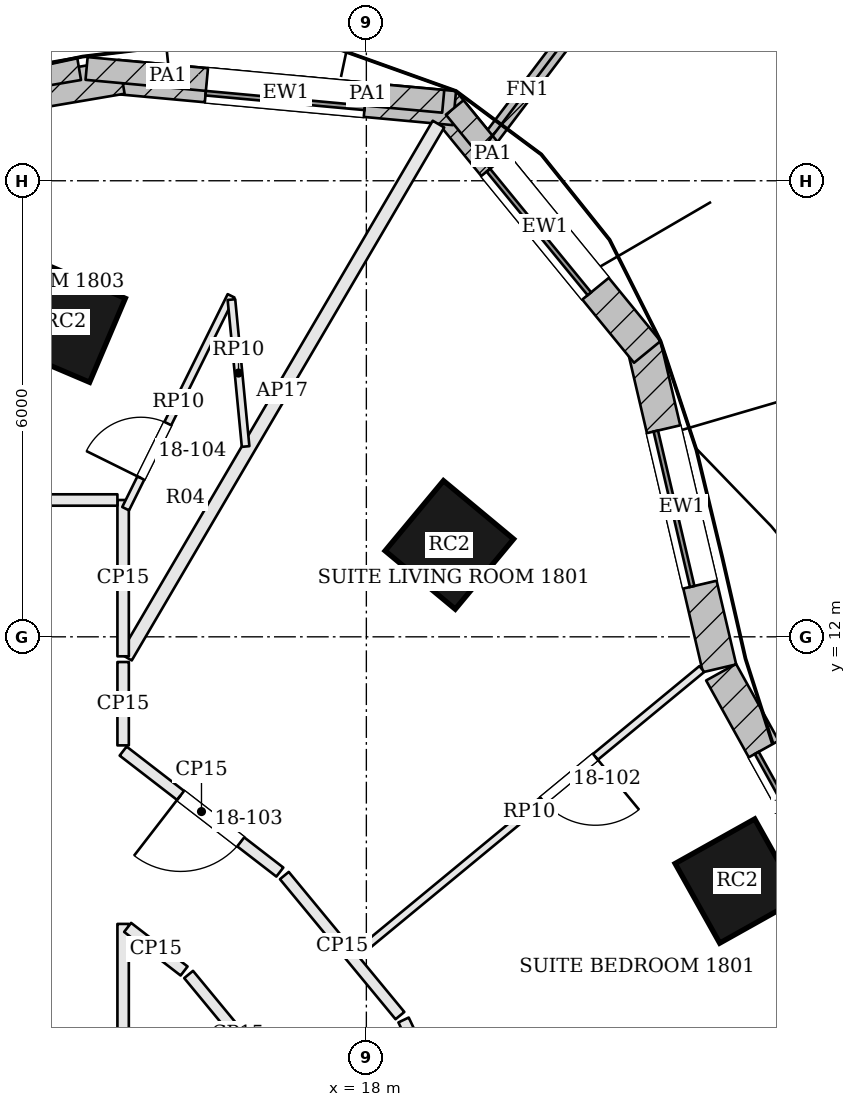
"""IFC4 building model, lengths in metres.
Left out: names, types, materials, properties, quantities, classifications, styles, units other than length and angle.
Written with IfcOpenShell. Run it as: python <this file> out.ifc"""

import sys

from ifc_helpers import new_model, si_unit, direction, frame, frame_2d, origin, origin_2d, place, context, subcontext, project, spatial, rectangle, extrude, element, fill, save


model = new_model("IFC4")
c1 = context("Model", 3, precision=1e-05, world=origin(), true_north=direction((0.0, 1.0)))
c2 = subcontext(c1, "Body", "Model", "MODEL_VIEW")
j1 = project(units=[si_unit("LENGTHUNIT", "METRE"), si_unit("PLANEANGLEUNIT", "RADIAN")], contexts=[c1])
p1 = place(None, origin())
s1 = spatial("IfcSite", under=j1, at=p1, CompositionType="ELEMENT")
p2 = place(p1, origin())
s2 = spatial("IfcBuilding", under=s1, at=p2, CompositionType="ELEMENT")
p3 = place(p2, frame((0.0, 0.0, 81.6)))
s3 = spatial("IfcBuildingStorey", under=s2, at=p3, CompositionType="ELEMENT", Elevation=81.6)
for number, where, z_axis, x_axis in (
    (1, (22.879, 8.787, -0.7), (0.0, 0.0, 1.0), (-0.489, 0.873, 0.0)),
    (2, (19.092, 13.209, -0.7), (0.0, 0.0, 1.0), (-0.769, 0.639, 0.0)),
    (3, (14.042, 16.136, -0.7), (0.0, 0.0, 1.0), (-0.92, 0.392, 0.0)),
):
    element("IfcColumn", number, at=place(p3, frame(where, z_axis=z_axis, x_axis=x_axis)), inside=s3, PredefinedType="COLUMN", context=c2, shape_type="SweptSolid", body=[
        extrude(rectangle(XDim=1.2, YDim=1.2, at=origin_2d()), origin(), (0.0, 0.0, 1.0), 4.3),
    ])
p4 = place(p3, frame((24.662, 7.939, 0.0), z_axis=(0.0, 0.0, 1.0), x_axis=(-0.485153910721, 0.874428775208, 0.0)))
e4 = element("IfcWall", 4, at=p4, inside=s3, PredefinedType="SOLIDWALL", context=c2, shape_type="SweptSolid", body=[
    extrude(rectangle(XDim=4.112, YDim=0.45, at=frame_2d((2.056, 0.0))), origin(), (0.0, 0.0, 1.0), 3.4),
])
p5 = place(p4, frame((1.156, 0.0, 0.9)))
e5 = element("IfcOpeningElement", 5, at=p5, cuts=e4, PredefinedType="OPENING", context=c2, shape_type="SweptSolid", body=[
    extrude(rectangle(XDim=1.8, YDim=2.0, at=frame_2d((0.9, 1.0))), frame((0.0, 0.235, 0.0), z_axis=(0.0, -1.0, 0.0), x_axis=(1.0, 0.0, 0.0)), (0.0, 0.0, 1.0), 0.47),
])
p6 = place(p3, frame((22.646, 11.586, 0.0), z_axis=(0.0, 0.0, 1.0), x_axis=(-0.227925124198, 0.973678662475, 0.0)))
e6 = element("IfcWall", 6, at=p6, inside=s3, PredefinedType="SOLIDWALL", context=c2, shape_type="SweptSolid", body=[
    extrude(rectangle(XDim=4.361, YDim=0.45, at=frame_2d((2.18, 0.0))), origin(), (0.0, 0.0, 1.0), 3.4),
])
p7 = place(p6, frame((1.13, 0.0, 0.9)))
e7 = element("IfcOpeningElement", 7, at=p7, cuts=e6, PredefinedType="OPENING", context=c2, shape_type="SweptSolid", body=[
    extrude(rectangle(XDim=2.1, YDim=2.0, at=frame_2d((1.05, 1.0))), frame((0.0, 0.235, 0.0), z_axis=(0.0, -1.0, 0.0), x_axis=(1.0, 0.0, 0.0)), (0.0, 0.0, 1.0), 0.47),
])
p8 = place(p3, frame((21.696, 15.748, 0.0), z_axis=(0.0, 0.0, 1.0), x_axis=(-0.632968710519, 0.774177377288, 0.0)))
e8 = element("IfcWall", 8, at=p8, inside=s3, PredefinedType="SOLIDWALL", context=c2, shape_type="SweptSolid", body=[
    extrude(rectangle(XDim=4.25, YDim=0.45, at=frame_2d((2.125, 0.0))), origin(), (0.0, 0.0, 1.0), 3.4),
])
p9 = place(p8, frame((1.075, 0.0, 0.9)))
e9 = element("IfcOpeningElement", 9, at=p9, cuts=e8, PredefinedType="OPENING", context=c2, shape_type="SweptSolid", body=[
    extrude(rectangle(XDim=2.1, YDim=2.0, at=frame_2d((1.05, 1.0))), frame((0.0, 0.235, 0.0), z_axis=(0.0, -1.0, 0.0), x_axis=(1.0, 0.0, 0.0)), (0.0, 0.0, 1.0), 0.47),
])
p10 = place(p3, frame((19.159, 18.956, 0.0), z_axis=(0.0, 0.0, 1.0), x_axis=(-0.995777399421, 0.091800712424, 0.0)))
e10 = element("IfcWall", 10, at=p10, inside=s3, PredefinedType="SOLIDWALL", context=c2, shape_type="SweptSolid", body=[
    extrude(rectangle(XDim=4.455, YDim=0.45, at=frame_2d((2.227, 0.0))), origin(), (0.0, 0.0, 1.0), 3.4),
])
p11 = place(p10, frame((1.177, 0.0, 0.9)))
e11 = element("IfcOpeningElement", 11, at=p11, cuts=e10, PredefinedType="OPENING", context=c2, shape_type="SweptSolid", body=[
    extrude(rectangle(XDim=2.1, YDim=2.0, at=frame_2d((1.05, 1.0))), frame((0.0, 0.235, 0.0), z_axis=(0.0, -1.0, 0.0), x_axis=(1.0, 0.0, 0.0)), (0.0, 0.0, 1.0), 0.47),
])
p12 = place(p3, frame((14.782, 19.367, 0.0), z_axis=(0.0, 0.0, 1.0), x_axis=(-0.98585584667, -0.167595493934, 0.0)))
e12 = element("IfcWall", 12, at=p12, inside=s3, PredefinedType="SOLIDWALL", context=c2, shape_type="SweptSolid", body=[
    extrude(rectangle(XDim=5.399, YDim=0.45, at=frame_2d((2.699, 0.0))), origin(), (0.0, 0.0, 1.0), 3.4),
])
p13 = place(p12, frame((1.649, 0.0, 0.9)))
e13 = element("IfcOpeningElement", 13, at=p13, cuts=e12, PredefinedType="OPENING", context=c2, shape_type="SweptSolid", body=[
    extrude(rectangle(XDim=2.1, YDim=2.0, at=frame_2d((1.05, 1.0))), frame((0.0, 0.235, 0.0), z_axis=(0.0, -1.0, 0.0), x_axis=(1.0, 0.0, 0.0)), (0.0, 0.0, 1.0), 0.47),
])
p14 = place(p3, frame((19.591, 18.498, 0.0), z_axis=(0.0, 0.0, 1.0), x_axis=(0.603387525063, 0.797448114048, 0.0)))
e14 = element("IfcWall", 14, at=p14, inside=s3, PredefinedType="SOLIDWALL", context=c2, shape_type="SweptSolid", body=[
    extrude(rectangle(XDim=1.75, YDim=0.2, at=frame_2d((0.875, 0.0))), origin(), (0.0, 0.0, 1.0), 3.4),
])
p15 = place(p3, frame((20.168, 17.734, 3.6), z_axis=(0.0, 0.0, 1.0), x_axis=(-0.632995189145, 0.774155727564, 0.0)))
e15 = element("IfcWall", 15, at=p15, inside=s3, PredefinedType="PARAPET", context=c2, shape_type="SweptSolid", body=[
    extrude(rectangle(XDim=1.589, YDim=0.3, at=frame_2d((0.795, 0.0))), origin(), (0.0, 0.0, 1.0), 1.1),
])
p16 = place(p3, frame((19.011, 19.045, 3.6), z_axis=(0.0, 0.0, 1.0), x_axis=(-0.995779953678, 0.09177300176, 0.0)))
e16 = element("IfcWall", 16, at=p16, inside=s3, PredefinedType="PARAPET", context=c2, shape_type="SweptSolid", body=[
    extrude(rectangle(XDim=1.992, YDim=0.3, at=frame_2d((0.996, 0.0))), origin(), (0.0, 0.0, 1.0), 1.1),
])
p17 = place(p3, frame((16.462, 19.28, 3.6), z_axis=(0.0, 0.0, 1.0), x_axis=(-0.995778015376, 0.091794030816, 0.0)))
e17 = element("IfcWall", 17, at=p17, inside=s3, PredefinedType="PARAPET", context=c2, shape_type="SweptSolid", body=[
    extrude(rectangle(XDim=2.152, YDim=0.3, at=frame_2d((1.076, 0.0))), origin(), (0.0, 0.0, 1.0), 1.1),
])
p18 = place(p3, frame((14.221, 19.473, 3.6), z_axis=(0.0, 0.0, 1.0), x_axis=(-0.985864880964, -0.167542342353, 0.0)))
e18 = element("IfcWall", 18, at=p18, inside=s3, PredefinedType="PARAPET", context=c2, shape_type="SweptSolid", body=[
    extrude(rectangle(XDim=3.438, YDim=0.3, at=frame_2d((1.719, 0.0))), origin(), (0.0, 0.0, 1.0), 1.1),
])
p19 = place(p3, frame((19.495, 4.836, 0.0), z_axis=(0.0, 0.0, 1.0), x_axis=(-0.428157819028, 0.903703979191, 0.0)))
e19 = element("IfcWall", 19, at=p19, inside=s3, PredefinedType="PARTITIONING", context=c2, shape_type="SweptSolid", body=[
    extrude(rectangle(XDim=2.349, YDim=0.15, at=frame_2d((1.175, 0.0))), origin(), (0.0, 0.0, 1.0), 2.784),
])
p20 = place(p3, frame((18.442, 7.017, 0.0), z_axis=(0.0, 0.0, 1.0), x_axis=(-0.636538018119, 0.7712453251, 0.0)))
e20 = element("IfcWall", 20, at=p20, inside=s3, PredefinedType="PARTITIONING", context=c2, shape_type="SweptSolid", body=[
    extrude(rectangle(XDim=2.389, YDim=0.15, at=frame_2d((1.194, 0.0))), origin(), (0.0, 0.0, 1.0), 2.784),
])
p21 = place(p3, frame((16.862, 8.905, 0.0), z_axis=(0.0, 0.0, 1.0), x_axis=(-0.791542595332, 0.611113999001, 0.0)))
e21 = element("IfcWall", 21, at=p21, inside=s3, PredefinedType="PARTITIONING", context=c2, shape_type="SweptSolid", body=[
    extrude(rectangle(XDim=2.605, YDim=0.15, at=frame_2d((1.302, 0.0))), origin(), (0.0, 0.0, 1.0), 2.784),
])
p22 = place(p21, frame((0.65, 0.0, 0.0)))
e22 = element("IfcOpeningElement", 22, at=p22, cuts=e21, PredefinedType="OPENING", context=c2, shape_type="SweptSolid", body=[
    extrude(rectangle(XDim=1.0, YDim=2.1, at=frame_2d((0.5, 1.05))), frame((0.0, 0.085, 0.0), z_axis=(0.0, -1.0, 0.0), x_axis=(1.0, 0.0, 0.0)), (0.0, 0.0, 1.0), 0.17),
])
p23 = place(p3, frame((14.8, 10.572, 0.0), z_axis=(0.0, 0.0, 1.0), x_axis=(0.0, 1.0, 0.0)))
e23 = element("IfcWall", 23, at=p23, inside=s3, PredefinedType="PARTITIONING", context=c2, shape_type="SweptSolid", body=[
    extrude(rectangle(XDim=1.097, YDim=0.15, at=frame_2d((0.548, 0.0))), origin(), (0.0, 0.0, 1.0), 2.784),
])
p24 = place(p3, frame((18.949, 18.745, 0.0), z_axis=(0.0, 0.0, 1.0), x_axis=(-0.505754187447, -0.862677634972, 0.0)))
e24 = element("IfcWall", 24, at=p24, inside=s3, PredefinedType="PARTITIONING", context=c2, shape_type="SweptSolid", body=[
    extrude(rectangle(XDim=8.128, YDim=0.175, at=frame_2d((4.064, 0.0))), origin(), (0.0, 0.0, 1.0), 2.784),
])
p25 = place(p3, frame((14.8, 11.744, 0.0), z_axis=(0.0, 0.0, 1.0), x_axis=(0.0, 1.0, 0.0)))
e25 = element("IfcWall", 25, at=p25, inside=s3, PredefinedType="PARTITIONING", context=c2, shape_type="SweptSolid", body=[
    extrude(rectangle(XDim=2.056, YDim=0.15, at=frame_2d((1.028, 0.0))), origin(), (0.0, 0.0, 1.0), 2.784),
])
p26 = place(p3, frame((14.725, 13.8, 0.0), z_axis=(0.0, 0.0, 1.0), x_axis=(-1.0, 0.0, 0.0)))
e26 = element("IfcWall", 26, at=p26, inside=s3, PredefinedType="PARTITIONING", context=c2, shape_type="SweptSolid", body=[
    extrude(rectangle(XDim=11.889, YDim=0.15, at=frame_2d((5.945, 0.0))), origin(), (0.0, 0.0, 1.0), 2.784),
])
p27 = place(p26, frame((10.041, 0.0, 0.0)))
e27 = element("IfcOpeningElement", 27, at=p27, cuts=e26, PredefinedType="OPENING", context=c2, shape_type="SweptSolid", body=[
    extrude(rectangle(XDim=1.0, YDim=2.1, at=frame_2d((0.5, 1.05))), frame((0.0, 0.085, 0.0), z_axis=(0.0, -1.0, 0.0), x_axis=(1.0, 0.0, 0.0)), (0.0, 0.0, 1.0), 0.17),
])
p28 = place(p3, frame((15.662, 7.558, 0.0), z_axis=(0.0, 0.0, 1.0), x_axis=(0.636500564941, -0.7712762351, 0.0)))
e28 = element("IfcWall", 28, at=p28, inside=s3, PredefinedType="PARTITIONING", context=c2, shape_type="SweptSolid", body=[
    extrude(rectangle(XDim=2.038, YDim=0.15, at=frame_2d((1.019, 0.0))), origin(), (0.0, 0.0, 1.0), 2.784),
])
p29 = place(p3, frame((14.8, -4.725, 0.0), z_axis=(0.0, 0.0, 1.0), x_axis=(0.0, 1.0, 0.0)))
e29 = element("IfcWall", 29, at=p29, inside=s3, PredefinedType="PARTITIONING", context=c2, shape_type="SweptSolid", body=[
    extrude(rectangle(XDim=12.948, YDim=0.15, at=frame_2d((6.474, 0.0))), origin(), (0.0, 0.0, 1.0), 2.784),
])
p30 = place(p29, frame((5.536, 0.0, 0.0)))
e30 = element("IfcOpeningElement", 30, at=p30, cuts=e29, PredefinedType="OPENING", context=c2, shape_type="SweptSolid", body=[
    extrude(rectangle(XDim=1.8, YDim=2.1, at=frame_2d((0.9, 1.05))), frame((0.0, 0.085, 0.0), z_axis=(0.0, -1.0, 0.0), x_axis=(1.0, 0.0, 0.0)), (0.0, 0.0, 1.0), 0.17),
])
p31 = place(p3, frame((14.859, 8.177, 0.0), z_axis=(0.0, 0.0, 1.0), x_axis=(0.791588113465, -0.611055037309, 0.0)))
e31 = element("IfcWall", 31, at=p31, inside=s3, PredefinedType="PARTITIONING", context=c2, shape_type="SweptSolid", body=[
    extrude(rectangle(XDim=0.938, YDim=0.15, at=frame_2d((0.469, 0.0))), origin(), (0.0, 0.0, 1.0), 2.784),
])
p32 = place(p3, frame((22.414, 11.576, 0.0), z_axis=(0.0, 0.0, 1.0), x_axis=(-0.77113161257, -0.636675769992, 0.0)))
e32 = element("IfcWall", 32, at=p32, inside=s3, PredefinedType="PARTITIONING", context=c2, shape_type="SweptSolid", body=[
    extrude(rectangle(XDim=5.89, YDim=0.1, at=frame_2d((2.945, 0.0))), origin(), (0.0, 0.0, 1.0), 2.784),
])
p33 = place(p32, frame((1.815, 0.0, 0.0)))
e33 = element("IfcOpeningElement", 33, at=p33, cuts=e32, PredefinedType="OPENING", context=c2, shape_type="SweptSolid", body=[
    extrude(rectangle(XDim=0.9, YDim=2.4, at=frame_2d((0.45, 1.2))), frame((0.0, 0.06, 0.0), z_axis=(0.0, -1.0, 0.0), x_axis=(1.0, 0.0, 0.0)), (0.0, 0.0, 1.0), 0.12),
])
p34 = place(p3, frame((14.833, 13.686, 0.0), z_axis=(0.0, 0.0, 1.0), x_axis=(0.443835356617, 0.896108350712, 0.0)))
e34 = element("IfcWall", 34, at=p34, inside=s3, PredefinedType="PARTITIONING", context=c2, shape_type="SweptSolid", body=[
    extrude(rectangle(XDim=3.125, YDim=0.1, at=frame_2d((1.562, 0.0))), origin(), (0.0, 0.0, 1.0), 2.784),
])
p35 = place(p34, frame((0.45, 0.0, 0.0)))
e35 = element("IfcOpeningElement", 35, at=p35, cuts=e34, PredefinedType="OPENING", context=c2, shape_type="SweptSolid", body=[
    extrude(rectangle(XDim=0.8, YDim=2.1, at=frame_2d((0.4, 1.05))), frame((0.0, 0.06, 0.0), z_axis=(0.0, -1.0, 0.0), x_axis=(1.0, 0.0, 0.0)), (0.0, 0.0, 1.0), 0.12),
])
p36 = place(p3, frame((16.225, 16.436, 0.0), z_axis=(0.0, 0.0, 1.0), x_axis=(0.095954429619, -0.995385727965, 0.0)))
e36 = element("IfcWall", 36, at=p36, inside=s3, PredefinedType="PARTITIONING", context=c2, shape_type="SweptSolid", body=[
    extrude(rectangle(XDim=1.941, YDim=0.1, at=frame_2d((0.971, 0.0))), origin(), (0.0, 0.0, 1.0), 2.784),
])
p37 = place(p5, origin())
e37 = element("IfcWindow", 37, at=p37, inside=s3, PartitioningType="SINGLE_PANEL", PredefinedType="WINDOW", context=c2, shape_type="SweptSolid", body=[
    extrude(rectangle(XDim=1.8, YDim=2.0, at=frame_2d((0.9, 1.0))), frame((0.0, 0.135, 0.0), z_axis=(0.0, -1.0, 0.0), x_axis=(1.0, 0.0, 0.0)), (0.0, 0.0, 1.0), 0.06),
])
fill(e5, e37)
p38 = place(p7, origin())
e38 = element("IfcWindow", 38, at=p38, inside=s3, PartitioningType="SINGLE_PANEL", PredefinedType="WINDOW", context=c2, shape_type="SweptSolid", body=[
    extrude(rectangle(XDim=2.1, YDim=2.0, at=frame_2d((1.05, 1.0))), frame((0.0, 0.135, 0.0), z_axis=(0.0, -1.0, 0.0), x_axis=(1.0, 0.0, 0.0)), (0.0, 0.0, 1.0), 0.06),
])
fill(e7, e38)
p39 = place(p9, origin())
e39 = element("IfcWindow", 39, at=p39, inside=s3, PartitioningType="SINGLE_PANEL", PredefinedType="WINDOW", context=c2, shape_type="SweptSolid", body=[
    extrude(rectangle(XDim=2.1, YDim=2.0, at=frame_2d((1.05, 1.0))), frame((0.0, 0.135, 0.0), z_axis=(0.0, -1.0, 0.0), x_axis=(1.0, 0.0, 0.0)), (0.0, 0.0, 1.0), 0.06),
])
fill(e9, e39)
p40 = place(p11, origin())
e40 = element("IfcWindow", 40, at=p40, inside=s3, PartitioningType="SINGLE_PANEL", PredefinedType="WINDOW", context=c2, shape_type="SweptSolid", body=[
    extrude(rectangle(XDim=2.1, YDim=2.0, at=frame_2d((1.05, 1.0))), frame((0.0, 0.135, 0.0), z_axis=(0.0, -1.0, 0.0), x_axis=(1.0, 0.0, 0.0)), (0.0, 0.0, 1.0), 0.06),
])
fill(e11, e40)
p41 = place(p33, origin())
e41 = element("IfcDoor", 41, at=p41, inside=s3, OperationType="SINGLE_SWING_LEFT", PredefinedType="DOOR", context=c2, shape_type="SweptSolid", body=[
    extrude(rectangle(XDim=0.9, YDim=2.4, at=frame_2d((0.45, 1.2))), frame((0.0, 0.025, 0.0), z_axis=(0.0, -1.0, 0.0), x_axis=(1.0, 0.0, 0.0)), (0.0, 0.0, 1.0), 0.05),
])
fill(e33, e41)
p42 = place(p22, origin())
e42 = element("IfcDoor", 42, at=p42, inside=s3, OperationType="SINGLE_SWING_RIGHT", PredefinedType="DOOR", context=c2, shape_type="SweptSolid", body=[
    extrude(rectangle(XDim=1.0, YDim=2.1, at=frame_2d((0.5, 1.05))), frame((0.0, 0.025, 0.0), z_axis=(0.0, -1.0, 0.0), x_axis=(1.0, 0.0, 0.0)), (0.0, 0.0, 1.0), 0.05),
])
fill(e22, e42)
p43 = place(p35, origin())
e43 = element("IfcDoor", 43, at=p43, inside=s3, OperationType="SINGLE_SWING_LEFT", PredefinedType="DOOR", context=c2, shape_type="SweptSolid", body=[
    extrude(rectangle(XDim=0.8, YDim=2.1, at=frame_2d((0.4, 1.05))), frame((0.0, 0.025, 0.0), z_axis=(0.0, -1.0, 0.0), x_axis=(1.0, 0.0, 0.0)), (0.0, 0.0, 1.0), 0.05),
])
fill(e35, e43)
save(model, sys.argv[1])
